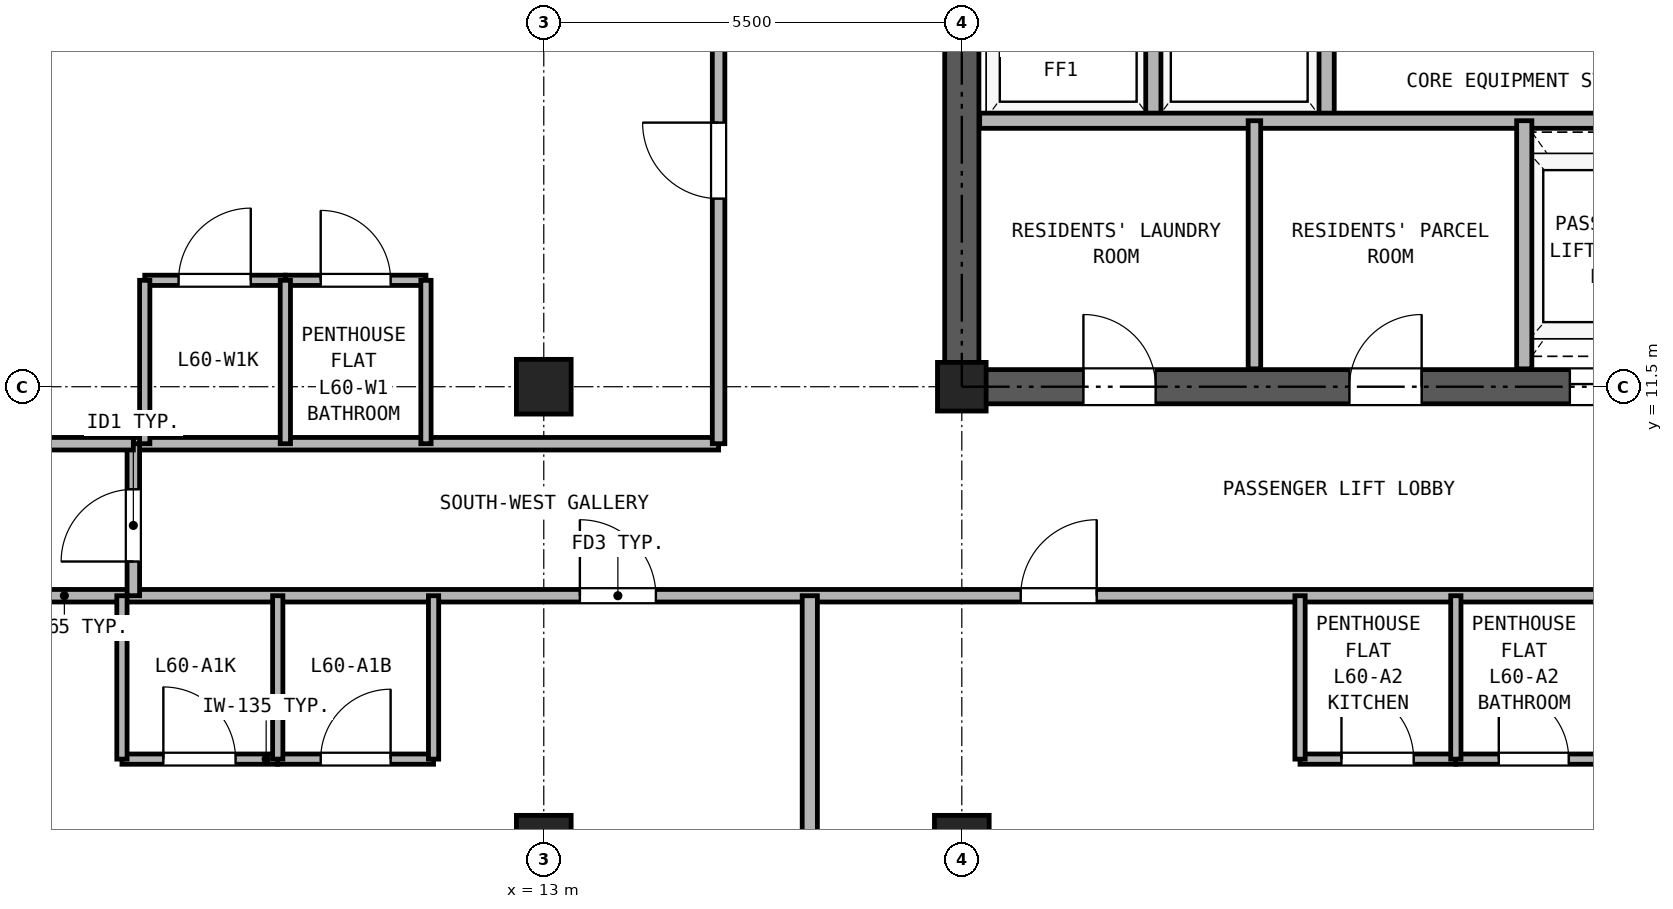
"""IFC4 building model, lengths in metres.
Left out: names, types, materials, properties, quantities, classifications, styles, units other than length and angle.
Written with IfcOpenShell. Run it as: python <this file> out.ifc"""

import sys

from ifc_helpers import new_model, si_unit, direction, frame, frame_2d, origin, origin_2d, place, context, subcontext, project, spatial, rectangle, hollow_rectangle, extrude, source, transform, mapped, element, fill, save


model = new_model("IFC4")
c1 = context("Model", 3, precision=1e-05, world=origin(), true_north=direction((0.0, 1.0)))
c2 = subcontext(c1, "Body", "Model", "MODEL_VIEW")
j1 = project(units=[si_unit("LENGTHUNIT", "METRE"), si_unit("PLANEANGLEUNIT", "RADIAN")], contexts=[c1])
p1 = place(None, origin())
s1 = spatial("IfcSite", under=j1, at=p1, CompositionType="ELEMENT")
p2 = place(p1, origin())
s2 = spatial("IfcBuilding", under=s1, at=p2, CompositionType="ELEMENT")
p3 = place(p2, frame((0.0, 0.0, 212.4)))
s3 = spatial("IfcBuildingStorey", under=s2, at=p3, CompositionType="ELEMENT", Elevation=212.4)
m1 = source(origin(), c2, "Body", "SweptSolid", [
    extrude(hollow_rectangle(XDim=0.72, YDim=0.72, WallThickness=0.04, at=origin_2d()), origin(), (0.0, 0.0, 1.0), 2.84),
])
for number, where, z_axis, x_axis in (
    (1, (13.0, 5.5, 0.0), (0.0, 0.0, 1.0), (1.0, 0.0, 0.0)),
    (2, (13.0, 11.5, 0.0), (0.0, 0.0, 1.0), (1.0, 0.0, 0.0)),
    (3, (18.5, 5.5, 0.0), (0.0, 0.0, 1.0), (1.0, 0.0, 0.0)),
):
    element("IfcColumn", number, at=place(p3, frame(where, z_axis=z_axis, x_axis=x_axis)), inside=s3, PredefinedType="COLUMN", context=c2, shape_type="MappedRepresentation", body=[
        mapped(m1, transform((0.0, 0.0, 0.0), x_axis=(1.0, 0.0, 0.0), y_axis=(0.0, 1.0, 0.0), z_axis=(0.0, 0.0, 1.0), scale=1.0)),
    ])
m2 = source(origin(), c2, "Body", "SweptSolid", [
    extrude(hollow_rectangle(XDim=0.64, YDim=0.64, WallThickness=0.035, at=origin_2d()), origin(), (0.0, 0.0, 1.0), 2.84),
])
p4 = place(p3, frame((18.5, 11.5, 0.0), z_axis=(0.0, 0.0, 1.0), x_axis=(1.0, 0.0, 0.0)))
e4 = element("IfcColumn", 4, at=p4, inside=s3, PredefinedType="COLUMN", context=c2, shape_type="MappedRepresentation", body=[
    mapped(m2, transform((0.0, 0.0, 0.0), x_axis=(1.0, 0.0, 0.0), y_axis=(0.0, 1.0, 0.0), z_axis=(0.0, 0.0, 1.0), scale=1.0)),
])
p5 = place(p3, frame((18.275, 11.5, 0.0), z_axis=(0.0, 0.0, 1.0), x_axis=(1.0, 0.0, 0.0)))
e5 = element("IfcWall", 5, at=p5, inside=s3, PredefinedType="SHEAR", context=c2, shape_type="SweptSolid", body=[
    extrude(rectangle(XDim=10.45, YDim=0.45, at=frame_2d((5.225, 0.0))), origin(), (0.0, 0.0, 1.0), 2.84),
])
p6 = place(p5, frame((1.825, 0.0, 0.0)))
e6 = element("IfcOpeningElement", 6, at=p6, cuts=e5, PredefinedType="OPENING", context=c2, shape_type="SweptSolid", body=[
    extrude(rectangle(XDim=0.95, YDim=2.15, at=frame_2d((0.475, 1.075))), frame((0.0, 0.235, 0.0), z_axis=(0.0, -1.0, 0.0), x_axis=(1.0, 0.0, 0.0)), (0.0, 0.0, 1.0), 0.47),
])
p7 = place(p5, frame((5.325, 0.0, 0.0)))
e7 = element("IfcOpeningElement", 7, at=p7, cuts=e5, PredefinedType="OPENING", context=c2, shape_type="SweptSolid", body=[
    extrude(rectangle(XDim=0.95, YDim=2.15, at=frame_2d((0.475, 1.075))), frame((0.0, 0.235, 0.0), z_axis=(0.0, -1.0, 0.0), x_axis=(1.0, 0.0, 0.0)), (0.0, 0.0, 1.0), 0.47),
])
p8 = place(p5, frame((8.225, 0.0, 0.0)))
e8 = element("IfcOpeningElement", 8, at=p8, cuts=e5, PredefinedType="OPENING", context=c2, shape_type="SweptSolid", body=[
    extrude(rectangle(XDim=1.1, YDim=2.25, at=frame_2d((0.55, 1.125))), frame((0.0, 0.235, 0.0), z_axis=(0.0, -1.0, 0.0), x_axis=(1.0, 0.0, 0.0)), (0.0, 0.0, 1.0), 0.47),
])
p9 = place(p3, frame((18.5, 11.725, 0.0), z_axis=(0.0, 0.0, 1.0), x_axis=(0.0, 1.0, 0.0)))
e9 = element("IfcWall", 9, at=p9, inside=s3, PredefinedType="SHEAR", context=c2, shape_type="SweptSolid", body=[
    extrude(rectangle(XDim=16.8, YDim=0.45, at=frame_2d((8.4, 0.0))), origin(), (0.0, 0.0, 1.0), 2.84),
])
p10 = place(p9, frame((7.425, 0.0, 0.0)))
e10 = element("IfcOpeningElement", 10, at=p10, cuts=e9, PredefinedType="OPENING", context=c2, shape_type="SweptSolid", body=[
    extrude(rectangle(XDim=1.15, YDim=2.2, at=frame_2d((0.575, 1.1))), frame((0.0, 0.235, 0.0), z_axis=(0.0, -1.0, 0.0), x_axis=(1.0, 0.0, 0.0)), (0.0, 0.0, 1.0), 0.47),
])
for number, where, z_axis, x_axis in (
    (11, (21.02, 15.0, 0.0), (0.0, 0.0, 1.0), (0.0, 1.0, 0.0)),
    (12, (23.3, 15.0, 0.0), (0.0, 0.0, 1.0), (0.0, 1.0, 0.0)),
):
    element("IfcWall", number, at=place(p3, frame(where, z_axis=z_axis, x_axis=x_axis)), inside=s3, PredefinedType="PARTITIONING", context=c2, shape_type="SweptSolid", body=[
        extrude(rectangle(XDim=3.0, YDim=0.2, at=frame_2d((1.5, 0.0))), origin(), (0.0, 0.0, 1.0), 2.84),
    ])
p11 = place(p3, frame((18.735, 15.0, 0.0), z_axis=(0.0, 0.0, 1.0), x_axis=(1.0, 0.0, 0.0)))
e13 = element("IfcWall", 13, at=p11, inside=s3, PredefinedType="PARTITIONING", context=c2, shape_type="SweptSolid", body=[
    extrude(rectangle(XDim=9.53, YDim=0.2, at=frame_2d((4.765, 0.0))), origin(), (0.0, 0.0, 1.0), 2.84),
])
p12 = place(p3, frame((22.35, 11.735, 0.0), z_axis=(0.0, 0.0, 1.0), x_axis=(0.0, 1.0, 0.0)))
e14 = element("IfcWall", 14, at=p12, inside=s3, PredefinedType="PARTITIONING", context=c2, shape_type="SweptSolid", body=[
    extrude(rectangle(XDim=3.265, YDim=0.165, at=frame_2d((1.632, 0.0))), origin(), (0.0, 0.0, 1.0), 2.84),
])
p13 = place(p3, frame((25.9, 11.735, 0.0), z_axis=(0.0, 0.0, 1.0), x_axis=(0.0, 1.0, 0.0)))
e15 = element("IfcWall", 15, at=p13, inside=s3, PredefinedType="PARTITIONING", context=c2, shape_type="SweptSolid", body=[
    extrude(rectangle(XDim=3.265, YDim=0.2, at=frame_2d((1.632, 0.0))), origin(), (0.0, 0.0, 1.0), 2.84),
])
p14 = place(p3, frame((0.16, 8.75, 0.0), z_axis=(0.0, 0.0, 1.0), x_axis=(1.0, 0.0, 0.0)))
e16 = element("IfcWall", 16, at=p14, inside=s3, PredefinedType="PARTITIONING", context=c2, shape_type="SweptSolid", body=[
    extrude(rectangle(XDim=41.48, YDim=0.165, at=frame_2d((20.74, 0.0))), origin(), (0.0, 0.0, 1.0), 2.84),
])
p15 = place(p14, frame((13.315, 0.0, 0.0)))
e17 = element("IfcOpeningElement", 17, at=p15, cuts=e16, PredefinedType="OPENING", context=c2, shape_type="SweptSolid", body=[
    extrude(rectangle(XDim=1.0, YDim=2.15, at=frame_2d((0.5, 1.075))), frame((0.0, 0.093, 0.0), z_axis=(0.0, -1.0, 0.0), x_axis=(1.0, 0.0, 0.0)), (0.0, 0.0, 1.0), 0.185),
])
p16 = place(p14, frame((19.115, 0.0, 0.0)))
e18 = element("IfcOpeningElement", 18, at=p16, cuts=e16, PredefinedType="OPENING", context=c2, shape_type="SweptSolid", body=[
    extrude(rectangle(XDim=1.0, YDim=2.15, at=frame_2d((0.5, 1.075))), frame((0.0, 0.093, 0.0), z_axis=(0.0, -1.0, 0.0), x_axis=(1.0, 0.0, 0.0)), (0.0, 0.0, 1.0), 0.185),
])
p17 = place(p14, frame((31.865, 0.0, 0.0)))
e19 = element("IfcOpeningElement", 19, at=p17, cuts=e16, PredefinedType="OPENING", context=c2, shape_type="SweptSolid", body=[
    extrude(rectangle(XDim=1.0, YDim=2.15, at=frame_2d((0.5, 1.075))), frame((0.0, 0.093, 0.0), z_axis=(0.0, -1.0, 0.0), x_axis=(1.0, 0.0, 0.0)), (0.0, 0.0, 1.0), 0.185),
])
p18 = place(p3, frame((7.6, 10.75, 0.0), z_axis=(0.0, 0.0, 1.0), x_axis=(1.0, 0.0, 0.0)))
e20 = element("IfcWall", 20, at=p18, inside=s3, PredefinedType="PARTITIONING", context=c2, shape_type="SweptSolid", body=[
    extrude(rectangle(XDim=7.7, YDim=0.165, at=frame_2d((3.85, 0.0))), origin(), (0.0, 0.0, 1.0), 2.84),
])
p19 = place(p3, frame((7.6, 8.75, 0.0), z_axis=(0.0, 0.0, 1.0), x_axis=(0.0, 1.0, 0.0)))
e21 = element("IfcWall", 21, at=p19, inside=s3, PredefinedType="PARTITIONING", context=c2, shape_type="SweptSolid", body=[
    extrude(rectangle(XDim=2.0, YDim=0.165, at=frame_2d((1.0, 0.0))), origin(), (0.0, 0.0, 1.0), 2.84),
])
p20 = place(p19, frame((0.45, 0.0, 0.0)))
e22 = element("IfcOpeningElement", 22, at=p20, cuts=e21, PredefinedType="OPENING", context=c2, shape_type="SweptSolid", body=[
    extrude(rectangle(XDim=0.95, YDim=2.15, at=frame_2d((0.475, 1.075))), frame((0.0, 0.093, 0.0), z_axis=(0.0, -1.0, 0.0), x_axis=(1.0, 0.0, 0.0)), (0.0, 0.0, 1.0), 0.185),
])
p21 = place(p3, frame((15.3, 10.75, 0.0), z_axis=(0.0, 0.0, 1.0), x_axis=(0.0, 1.0, 0.0)))
e23 = element("IfcWall", 23, at=p21, inside=s3, PredefinedType="PARTITIONING", context=c2, shape_type="SweptSolid", body=[
    extrude(rectangle(XDim=24.39, YDim=0.165, at=frame_2d((12.195, 0.0))), origin(), (0.0, 0.0, 1.0), 2.84),
])
p22 = place(p21, frame((3.225, 0.0, 0.0)))
e24 = element("IfcOpeningElement", 24, at=p22, cuts=e23, PredefinedType="OPENING", context=c2, shape_type="SweptSolid", body=[
    extrude(rectangle(XDim=1.0, YDim=2.15, at=frame_2d((0.5, 1.075))), frame((0.0, 0.093, 0.0), z_axis=(0.0, -1.0, 0.0), x_axis=(1.0, 0.0, 0.0)), (0.0, 0.0, 1.0), 0.185),
])
p23 = place(p21, frame((11.15, 0.0, 0.0)))
e25 = element("IfcOpeningElement", 25, at=p23, cuts=e23, PredefinedType="OPENING", context=c2, shape_type="SweptSolid", body=[
    extrude(rectangle(XDim=1.0, YDim=2.15, at=frame_2d((0.5, 1.075))), frame((0.0, 0.093, 0.0), z_axis=(0.0, -1.0, 0.0), x_axis=(1.0, 0.0, 0.0)), (0.0, 0.0, 1.0), 0.185),
])
p24 = place(p21, frame((17.8, 0.0, 0.0)))
e26 = element("IfcOpeningElement", 26, at=p24, cuts=e23, PredefinedType="OPENING", context=c2, shape_type="SweptSolid", body=[
    extrude(rectangle(XDim=1.0, YDim=2.15, at=frame_2d((0.5, 1.075))), frame((0.0, 0.093, 0.0), z_axis=(0.0, -1.0, 0.0), x_axis=(1.0, 0.0, 0.0)), (0.0, 0.0, 1.0), 0.185),
])
p25 = place(p3, frame((7.45, 6.6, 0.0), z_axis=(0.0, 0.0, 1.0), x_axis=(1.0, 0.0, 0.0)))
e27 = element("IfcWall", 27, at=p25, inside=s3, PredefinedType="PARTITIONING", context=c2, shape_type="SweptSolid", body=[
    extrude(rectangle(XDim=2.05, YDim=0.135, at=frame_2d((1.025, 0.0))), origin(), (0.0, 0.0, 1.0), 2.84),
])
p26 = place(p25, frame((0.545, 0.0, 0.0)))
e28 = element("IfcOpeningElement", 28, at=p26, cuts=e27, PredefinedType="OPENING", context=c2, shape_type="SweptSolid", body=[
    extrude(rectangle(XDim=0.95, YDim=2.15, at=frame_2d((0.475, 1.075))), frame((0.0, 0.077, 0.0), z_axis=(0.0, -1.0, 0.0), x_axis=(1.0, 0.0, 0.0)), (0.0, 0.0, 1.0), 0.155),
])
p27 = place(p3, frame((9.5, 6.6, 0.0), z_axis=(0.0, 0.0, 1.0), x_axis=(1.0, 0.0, 0.0)))
e29 = element("IfcWall", 29, at=p27, inside=s3, PredefinedType="PARTITIONING", context=c2, shape_type="SweptSolid", body=[
    extrude(rectangle(XDim=2.05, YDim=0.135, at=frame_2d((1.025, 0.0))), origin(), (0.0, 0.0, 1.0), 2.84),
])
p28 = place(p27, frame((0.565, 0.0, 0.0)))
e30 = element("IfcOpeningElement", 30, at=p28, cuts=e29, PredefinedType="OPENING", context=c2, shape_type="SweptSolid", body=[
    extrude(rectangle(XDim=0.92, YDim=2.1, at=frame_2d((0.46, 1.05))), frame((0.0, 0.077, 0.0), z_axis=(0.0, -1.0, 0.0), x_axis=(1.0, 0.0, 0.0)), (0.0, 0.0, 1.0), 0.155),
])
for number, where, z_axis, x_axis in (
    (31, (7.45, 6.6, 0.0), (0.0, 0.0, 1.0), (0.0, 1.0, 0.0)),
    (32, (9.5, 6.6, 0.0), (0.0, 0.0, 1.0), (0.0, 1.0, 0.0)),
    (33, (11.55, 6.6, 0.0), (0.0, 0.0, 1.0), (0.0, 1.0, 0.0)),
):
    element("IfcWall", number, at=place(p3, frame(where, z_axis=z_axis, x_axis=x_axis)), inside=s3, PredefinedType="PARTITIONING", context=c2, shape_type="SweptSolid", body=[
        extrude(rectangle(XDim=2.15, YDim=0.135, at=frame_2d((1.075, 0.0))), origin(), (0.0, 0.0, 1.0), 2.84),
    ])
p29 = place(p3, frame((16.5, 0.16, 0.0), z_axis=(0.0, 0.0, 1.0), x_axis=(0.0, 1.0, 0.0)))
e34 = element("IfcWall", 34, at=p29, inside=s3, PredefinedType="PARTITIONING", context=c2, shape_type="SweptSolid", body=[
    extrude(rectangle(XDim=8.59, YDim=0.2, at=frame_2d((4.295, 0.0))), origin(), (0.0, 0.0, 1.0), 2.84),
])
p30 = place(p3, frame((22.95, 6.6, 0.0), z_axis=(0.0, 0.0, 1.0), x_axis=(1.0, 0.0, 0.0)))
e35 = element("IfcWall", 35, at=p30, inside=s3, PredefinedType="PARTITIONING", context=c2, shape_type="SweptSolid", body=[
    extrude(rectangle(XDim=2.05, YDim=0.135, at=frame_2d((1.025, 0.0))), origin(), (0.0, 0.0, 1.0), 2.84),
])
p31 = place(p30, frame((0.545, 0.0, 0.0)))
e36 = element("IfcOpeningElement", 36, at=p31, cuts=e35, PredefinedType="OPENING", context=c2, shape_type="SweptSolid", body=[
    extrude(rectangle(XDim=0.95, YDim=2.15, at=frame_2d((0.475, 1.075))), frame((0.0, 0.077, 0.0), z_axis=(0.0, -1.0, 0.0), x_axis=(1.0, 0.0, 0.0)), (0.0, 0.0, 1.0), 0.155),
])
p32 = place(p3, frame((25.0, 6.6, 0.0), z_axis=(0.0, 0.0, 1.0), x_axis=(1.0, 0.0, 0.0)))
e37 = element("IfcWall", 37, at=p32, inside=s3, PredefinedType="PARTITIONING", context=c2, shape_type="SweptSolid", body=[
    extrude(rectangle(XDim=2.05, YDim=0.135, at=frame_2d((1.025, 0.0))), origin(), (0.0, 0.0, 1.0), 2.84),
])
p33 = place(p32, frame((0.565, 0.0, 0.0)))
e38 = element("IfcOpeningElement", 38, at=p33, cuts=e37, PredefinedType="OPENING", context=c2, shape_type="SweptSolid", body=[
    extrude(rectangle(XDim=0.92, YDim=2.1, at=frame_2d((0.46, 1.05))), frame((0.0, 0.077, 0.0), z_axis=(0.0, -1.0, 0.0), x_axis=(1.0, 0.0, 0.0)), (0.0, 0.0, 1.0), 0.155),
])
for number, where, z_axis, x_axis in (
    (39, (22.95, 6.6, 0.0), (0.0, 0.0, 1.0), (0.0, 1.0, 0.0)),
    (40, (25.0, 6.6, 0.0), (0.0, 0.0, 1.0), (0.0, 1.0, 0.0)),
):
    element("IfcWall", number, at=place(p3, frame(where, z_axis=z_axis, x_axis=x_axis)), inside=s3, PredefinedType="PARTITIONING", context=c2, shape_type="SweptSolid", body=[
        extrude(rectangle(XDim=2.15, YDim=0.135, at=frame_2d((1.075, 0.0))), origin(), (0.0, 0.0, 1.0), 2.84),
    ])
p34 = place(p3, frame((0.16, 10.75, 0.0), z_axis=(0.0, 0.0, 1.0), x_axis=(1.0, 0.0, 0.0)))
e41 = element("IfcWall", 41, at=p34, inside=s3, PredefinedType="PARTITIONING", context=c2, shape_type="SweptSolid", body=[
    extrude(rectangle(XDim=7.44, YDim=0.165, at=frame_2d((3.72, 0.0))), origin(), (0.0, 0.0, 1.0), 2.84),
])
p35 = place(p3, frame((7.75, 12.9, 0.0), z_axis=(0.0, 0.0, 1.0), x_axis=(1.0, 0.0, 0.0)))
e42 = element("IfcWall", 42, at=p35, inside=s3, PredefinedType="PARTITIONING", context=c2, shape_type="SweptSolid", body=[
    extrude(rectangle(XDim=1.85, YDim=0.135, at=frame_2d((0.925, 0.0))), origin(), (0.0, 0.0, 1.0), 2.84),
])
p36 = place(p35, frame((0.445, 0.0, 0.0)))
e43 = element("IfcOpeningElement", 43, at=p36, cuts=e42, PredefinedType="OPENING", context=c2, shape_type="SweptSolid", body=[
    extrude(rectangle(XDim=0.95, YDim=2.15, at=frame_2d((0.475, 1.075))), frame((0.0, 0.077, 0.0), z_axis=(0.0, -1.0, 0.0), x_axis=(1.0, 0.0, 0.0)), (0.0, 0.0, 1.0), 0.155),
])
p37 = place(p3, frame((9.6, 12.9, 0.0), z_axis=(0.0, 0.0, 1.0), x_axis=(1.0, 0.0, 0.0)))
e44 = element("IfcWall", 44, at=p37, inside=s3, PredefinedType="PARTITIONING", context=c2, shape_type="SweptSolid", body=[
    extrude(rectangle(XDim=1.85, YDim=0.135, at=frame_2d((0.925, 0.0))), origin(), (0.0, 0.0, 1.0), 2.84),
])
p38 = place(p37, frame((0.465, 0.0, 0.0)))
e45 = element("IfcOpeningElement", 45, at=p38, cuts=e44, PredefinedType="OPENING", context=c2, shape_type="SweptSolid", body=[
    extrude(rectangle(XDim=0.92, YDim=2.1, at=frame_2d((0.46, 1.05))), frame((0.0, 0.077, 0.0), z_axis=(0.0, -1.0, 0.0), x_axis=(1.0, 0.0, 0.0)), (0.0, 0.0, 1.0), 0.155),
])
for number, where, z_axis, x_axis in (
    (46, (7.75, 10.75, 0.0), (0.0, 0.0, 1.0), (0.0, 1.0, 0.0)),
    (47, (9.6, 10.75, 0.0), (0.0, 0.0, 1.0), (0.0, 1.0, 0.0)),
    (48, (11.45, 10.75, 0.0), (0.0, 0.0, 1.0), (0.0, 1.0, 0.0)),
):
    element("IfcWall", number, at=place(p3, frame(where, z_axis=z_axis, x_axis=x_axis)), inside=s3, PredefinedType="PARTITIONING", context=c2, shape_type="SweptSolid", body=[
        extrude(rectangle(XDim=2.15, YDim=0.135, at=frame_2d((1.075, 0.0))), origin(), (0.0, 0.0, 1.0), 2.84),
    ])
p39 = place(p6, frame((0.95, 0.0, 0.0), z_axis=(0.0, 0.0, 1.0), x_axis=(-1.0, 0.0, 0.0)))
e49 = element("IfcDoor", 49, at=p39, inside=s3, OperationType="SINGLE_SWING_LEFT", PredefinedType="DOOR", context=c2, shape_type="SweptSolid", body=[
    extrude(rectangle(XDim=0.95, YDim=2.15, at=frame_2d((0.475, 1.075))), frame((0.0, 0.025, 0.0), z_axis=(0.0, -1.0, 0.0), x_axis=(1.0, 0.0, 0.0)), (0.0, 0.0, 1.0), 0.05),
])
fill(e6, e49)
p40 = place(p7, frame((0.95, 0.0, 0.0), z_axis=(0.0, 0.0, 1.0), x_axis=(-1.0, 0.0, 0.0)))
e50 = element("IfcDoor", 50, at=p40, inside=s3, OperationType="SINGLE_SWING_RIGHT", PredefinedType="DOOR", context=c2, shape_type="SweptSolid", body=[
    extrude(rectangle(XDim=0.95, YDim=2.15, at=frame_2d((0.475, 1.075))), frame((0.0, 0.025, 0.0), z_axis=(0.0, -1.0, 0.0), x_axis=(1.0, 0.0, 0.0)), (0.0, 0.0, 1.0), 0.05),
])
fill(e7, e50)
p41 = place(p8, frame((1.1, 0.0, 0.0), z_axis=(0.0, 0.0, 1.0), x_axis=(-1.0, 0.0, 0.0)))
e51 = element("IfcDoor", 51, at=p41, inside=s3, OperationType="DOUBLE_DOOR_SLIDING", PredefinedType="DOOR", context=c2, shape_type="SweptSolid", body=[
    extrude(rectangle(XDim=1.1, YDim=2.25, at=frame_2d((0.55, 1.125))), frame((0.0, 0.025, 0.0), z_axis=(0.0, -1.0, 0.0), x_axis=(1.0, 0.0, 0.0)), (0.0, 0.0, 1.0), 0.05),
])
fill(e8, e51)
p42 = place(p26, origin())
e52 = element("IfcDoor", 52, at=p42, inside=s3, OperationType="SINGLE_SWING_LEFT", PredefinedType="DOOR", context=c2, shape_type="SweptSolid", body=[
    extrude(rectangle(XDim=0.95, YDim=2.15, at=frame_2d((0.475, 1.075))), frame((0.0, 0.025, 0.0), z_axis=(0.0, -1.0, 0.0), x_axis=(1.0, 0.0, 0.0)), (0.0, 0.0, 1.0), 0.05),
])
fill(e28, e52)
p43 = place(p28, origin())
e53 = element("IfcDoor", 53, at=p43, inside=s3, OperationType="SINGLE_SWING_RIGHT", PredefinedType="DOOR", context=c2, shape_type="SweptSolid", body=[
    extrude(rectangle(XDim=0.92, YDim=2.1, at=frame_2d((0.46, 1.05))), frame((0.0, 0.025, 0.0), z_axis=(0.0, -1.0, 0.0), x_axis=(1.0, 0.0, 0.0)), (0.0, 0.0, 1.0), 0.05),
])
fill(e30, e53)
p44 = place(p15, frame((1.0, 0.0, 0.0), z_axis=(0.0, 0.0, 1.0), x_axis=(-1.0, 0.0, 0.0)))
e54 = element("IfcDoor", 54, at=p44, inside=s3, OperationType="SINGLE_SWING_LEFT", PredefinedType="DOOR", context=c2, shape_type="SweptSolid", body=[
    extrude(rectangle(XDim=1.0, YDim=2.15, at=frame_2d((0.5, 1.075))), frame((0.0, 0.025, 0.0), z_axis=(0.0, -1.0, 0.0), x_axis=(1.0, 0.0, 0.0)), (0.0, 0.0, 1.0), 0.05),
])
fill(e17, e54)
p45 = place(p31, origin())
e55 = element("IfcDoor", 55, at=p45, inside=s3, OperationType="SINGLE_SWING_LEFT", PredefinedType="DOOR", context=c2, shape_type="SweptSolid", body=[
    extrude(rectangle(XDim=0.95, YDim=2.15, at=frame_2d((0.475, 1.075))), frame((0.0, 0.025, 0.0), z_axis=(0.0, -1.0, 0.0), x_axis=(1.0, 0.0, 0.0)), (0.0, 0.0, 1.0), 0.05),
])
fill(e36, e55)
p46 = place(p33, origin())
e56 = element("IfcDoor", 56, at=p46, inside=s3, OperationType="SINGLE_SWING_LEFT", PredefinedType="DOOR", context=c2, shape_type="SweptSolid", body=[
    extrude(rectangle(XDim=0.92, YDim=2.1, at=frame_2d((0.46, 1.05))), frame((0.0, 0.025, 0.0), z_axis=(0.0, -1.0, 0.0), x_axis=(1.0, 0.0, 0.0)), (0.0, 0.0, 1.0), 0.05),
])
fill(e38, e56)
p47 = place(p16, frame((1.0, 0.0, 0.0), z_axis=(0.0, 0.0, 1.0), x_axis=(-1.0, 0.0, 0.0)))
e57 = element("IfcDoor", 57, at=p47, inside=s3, OperationType="SINGLE_SWING_RIGHT", PredefinedType="DOOR", context=c2, shape_type="SweptSolid", body=[
    extrude(rectangle(XDim=1.0, YDim=2.15, at=frame_2d((0.5, 1.075))), frame((0.0, 0.025, 0.0), z_axis=(0.0, -1.0, 0.0), x_axis=(1.0, 0.0, 0.0)), (0.0, 0.0, 1.0), 0.05),
])
fill(e18, e57)
p48 = place(p20, frame((0.95, 0.0, 0.0), z_axis=(0.0, 0.0, 1.0), x_axis=(-1.0, 0.0, 0.0)))
e58 = element("IfcDoor", 58, at=p48, inside=s3, OperationType="SINGLE_SWING_LEFT", PredefinedType="DOOR", context=c2, shape_type="SweptSolid", body=[
    extrude(rectangle(XDim=0.95, YDim=2.15, at=frame_2d((0.475, 1.075))), frame((0.0, 0.025, 0.0), z_axis=(0.0, -1.0, 0.0), x_axis=(1.0, 0.0, 0.0)), (0.0, 0.0, 1.0), 0.05),
])
fill(e22, e58)
p49 = place(p36, origin())
e59 = element("IfcDoor", 59, at=p49, inside=s3, OperationType="SINGLE_SWING_RIGHT", PredefinedType="DOOR", context=c2, shape_type="SweptSolid", body=[
    extrude(rectangle(XDim=0.95, YDim=2.15, at=frame_2d((0.475, 1.075))), frame((0.0, 0.025, 0.0), z_axis=(0.0, -1.0, 0.0), x_axis=(1.0, 0.0, 0.0)), (0.0, 0.0, 1.0), 0.05),
])
fill(e43, e59)
p50 = place(p38, origin())
e60 = element("IfcDoor", 60, at=p50, inside=s3, OperationType="SINGLE_SWING_LEFT", PredefinedType="DOOR", context=c2, shape_type="SweptSolid", body=[
    extrude(rectangle(XDim=0.92, YDim=2.1, at=frame_2d((0.46, 1.05))), frame((0.0, 0.025, 0.0), z_axis=(0.0, -1.0, 0.0), x_axis=(1.0, 0.0, 0.0)), (0.0, 0.0, 1.0), 0.05),
])
fill(e45, e60)
p51 = place(p22, origin())
e61 = element("IfcDoor", 61, at=p51, inside=s3, OperationType="SINGLE_SWING_RIGHT", PredefinedType="DOOR", context=c2, shape_type="SweptSolid", body=[
    extrude(rectangle(XDim=1.0, YDim=2.15, at=frame_2d((0.5, 1.075))), frame((0.0, 0.025, 0.0), z_axis=(0.0, -1.0, 0.0), x_axis=(1.0, 0.0, 0.0)), (0.0, 0.0, 1.0), 0.05),
])
fill(e24, e61)
save(model, sys.argv[1])
